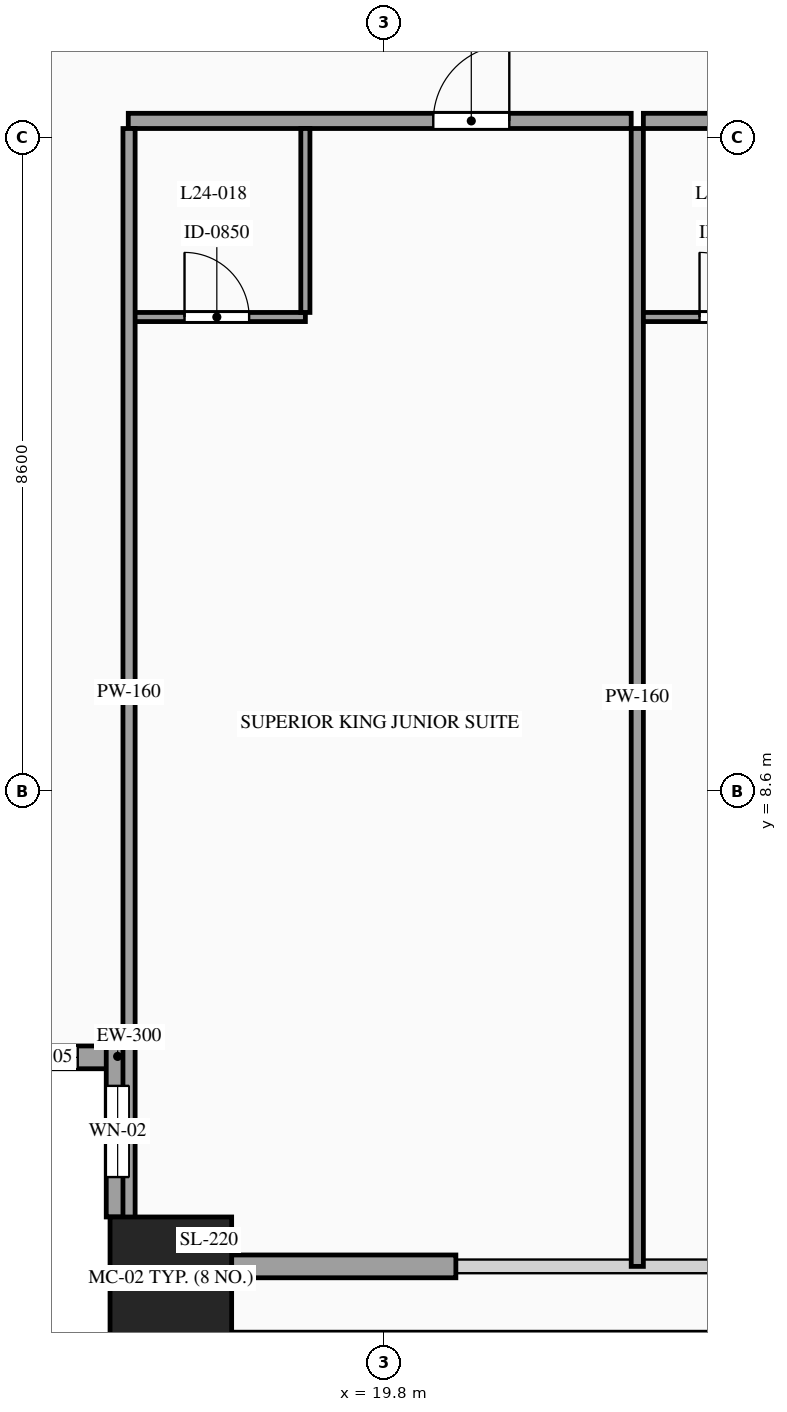
"""IFC4 building model, lengths in metres.
Left out: names, types, materials, properties, quantities, classifications, styles, units other than length and angle.
Written with IfcOpenShell. Run it as: python <this file> out.ifc"""

import sys

from ifc_helpers import new_model, si_unit, direction, frame, frame_2d, origin, origin_2d, place, context, subcontext, project, spatial, rectangle, hollow_rectangle, extrude, source, transform, mapped, element, fill, save


model = new_model("IFC4")
c1 = context("Model", 3, precision=1e-05, world=origin(), true_north=direction((0.0, 1.0)))
c2 = subcontext(c1, "Body", "Model", "MODEL_VIEW")
j1 = project(units=[si_unit("LENGTHUNIT", "METRE"), si_unit("PLANEANGLEUNIT", "RADIAN")], contexts=[c1])
p1 = place(None, origin())
s1 = spatial("IfcSite", under=j1, at=p1, CompositionType="ELEMENT")
p2 = place(p1, origin())
s2 = spatial("IfcBuilding", under=s1, at=p2, CompositionType="ELEMENT")
p3 = place(p2, frame((0.0, 0.0, 93.8)))
s3 = spatial("IfcBuildingStorey", under=s2, at=p3, CompositionType="ELEMENT", Elevation=93.8)
m1 = source(origin(), c2, "Body", "SweptSolid", [
    extrude(hollow_rectangle(XDim=1.6, YDim=1.6, WallThickness=0.07, at=origin_2d()), origin(), (0.0, 0.0, 1.0), 3.6),
])
p4 = place(p3, frame((17.0, 2.2, 0.0), z_axis=(0.0, 0.0, 1.0), x_axis=(1.0, 0.0, 0.0)))
e1 = element("IfcColumn", 1, at=p4, inside=s3, PredefinedType="COLUMN", context=c2, shape_type="MappedRepresentation", body=[
    mapped(m1, transform((0.0, 0.0, 0.0), scale=1.0)),
])
p5 = place(p3, frame((14.2, 5.1, 0.0), z_axis=(0.0, 0.0, 1.0), x_axis=(1.0, 0.0, 0.0)))
e2 = element("IfcWall", 2, at=p5, inside=s3, PredefinedType="SOLIDWALL", context=c2, shape_type="SweptSolid", body=[
    extrude(rectangle(XDim=2.25, YDim=0.3, at=frame_2d((1.125, 0.0))), origin(), (0.0, 0.0, 1.0), 3.38),
])
p6 = place(p5, frame((0.675, 0.0, 0.85)))
e3 = element("IfcOpeningElement", 3, at=p6, cuts=e2, PredefinedType="OPENING", context=c2, shape_type="SweptSolid", body=[
    extrude(rectangle(XDim=0.9, YDim=1.5, at=frame_2d((0.45, 0.75))), frame((0.0, 0.165, 0.0), z_axis=(0.0, -1.0, 0.0), x_axis=(1.0, 0.0, 0.0)), (0.0, 0.0, 1.0), 0.33),
])
p7 = place(p3, frame((16.3, 5.25, 0.0), z_axis=(0.0, 0.0, 1.0), x_axis=(0.0, -1.0, 0.0)))
e4 = element("IfcWall", 4, at=p7, inside=s3, PredefinedType="SOLIDWALL", context=c2, shape_type="SweptSolid", body=[
    extrude(rectangle(XDim=2.25, YDim=0.3, at=frame_2d((1.125, 0.0))), origin(), (0.0, 0.0, 1.0), 3.38),
])
p8 = place(p7, frame((0.525, 0.0, 0.85)))
e5 = element("IfcOpeningElement", 5, at=p8, cuts=e4, PredefinedType="OPENING", context=c2, shape_type="SweptSolid", body=[
    extrude(rectangle(XDim=1.2, YDim=2.1, at=frame_2d((0.6, 1.05))), frame((0.0, 0.165, 0.0), z_axis=(0.0, -1.0, 0.0), x_axis=(1.0, 0.0, 0.0)), (0.0, 0.0, 1.0), 0.33),
])
m2 = source(origin(), c2, "Body", "SweptSolid", [
    extrude(rectangle(XDim=2.95, YDim=0.3, at=frame_2d((1.475, 0.0))), origin(), (0.0, 0.0, 1.0), 2.775),
])
p9 = place(p3, frame((17.8, 2.35, 0.0), z_axis=(0.0, 0.0, 1.0), x_axis=(1.0, 0.0, 0.0)))
e6 = element("IfcWall", 6, at=p9, inside=s3, PredefinedType="SOLIDWALL", context=c2, shape_type="MappedRepresentation", body=[
    mapped(m2, transform((0.0, 0.0, 0.0), scale=1.0)),
])
p10 = place(p3, frame((16.44, 17.42, 0.0), z_axis=(0.0, 0.0, 1.0), x_axis=(1.0, 0.0, 0.0)))
e7 = element("IfcWall", 7, at=p10, inside=s3, PredefinedType="PARTITIONING", context=c2, shape_type="SweptSolid", body=[
    extrude(rectangle(XDim=6.617, YDim=0.2, at=frame_2d((3.309, 0.0))), origin(), (0.0, 0.0, 1.0), 3.38),
])
p11 = place(p10, frame((4.013, 0.0, 0.0)))
e8 = element("IfcOpeningElement", 8, at=p11, cuts=e7, PredefinedType="OPENING", context=c2, shape_type="SweptSolid", body=[
    extrude(rectangle(XDim=1.0, YDim=2.2, at=frame_2d((0.5, 1.1))), frame((0.0, 0.115, 0.0), z_axis=(0.0, -1.0, 0.0), x_axis=(1.0, 0.0, 0.0)), (0.0, 0.0, 1.0), 0.23),
])
m3 = source(origin(), c2, "Body", "SweptSolid", [
    extrude(rectangle(XDim=14.97, YDim=0.16, at=frame_2d((7.485, 0.0))), origin(), (0.0, 0.0, 1.0), 3.38),
])
p12 = place(p3, frame((23.137, 2.35, 0.0), z_axis=(0.0, 0.0, 1.0), x_axis=(0.0, 1.0, 0.0)))
e9 = element("IfcWall", 9, at=p12, inside=s3, PredefinedType="PARTITIONING", context=c2, shape_type="MappedRepresentation", body=[
    mapped(m3, transform((0.0, 0.0, 0.0), scale=1.0)),
])
p13 = place(p3, frame((16.44, 14.84, 0.0), z_axis=(0.0, 0.0, 1.0), x_axis=(1.0, 0.0, 0.0)))
e10 = element("IfcWall", 10, at=p13, inside=s3, PredefinedType="PARTITIONING", context=c2, shape_type="SweptSolid", body=[
    extrude(rectangle(XDim=2.33, YDim=0.12, at=frame_2d((1.165, 0.0))), origin(), (0.0, 0.0, 1.0), 3.38),
])
p14 = place(p13, frame((0.74, 0.0, 0.0)))
e11 = element("IfcOpeningElement", 11, at=p14, cuts=e10, PredefinedType="OPENING", context=c2, shape_type="SweptSolid", body=[
    extrude(rectangle(XDim=0.85, YDim=2.1, at=frame_2d((0.425, 1.05))), frame((0.0, 0.075, 0.0), z_axis=(0.0, -1.0, 0.0), x_axis=(1.0, 0.0, 0.0)), (0.0, 0.0, 1.0), 0.15),
])
m4 = source(origin(), c2, "Body", "SweptSolid", [
    extrude(rectangle(XDim=2.42, YDim=0.12, at=frame_2d((1.21, 0.0))), origin(), (0.0, 0.0, 1.0), 3.38),
])
p15 = place(p3, frame((18.77, 14.9, 0.0), z_axis=(0.0, 0.0, 1.0), x_axis=(0.0, 1.0, 0.0)))
e12 = element("IfcWall", 12, at=p15, inside=s3, PredefinedType="PARTITIONING", context=c2, shape_type="MappedRepresentation", body=[
    mapped(m4, transform((0.0, 0.0, 0.0), scale=1.0)),
])
p16 = place(p3, frame((23.217, 17.42, 0.0), z_axis=(0.0, 0.0, 1.0), x_axis=(1.0, 0.0, 0.0)))
e13 = element("IfcWall", 13, at=p16, inside=s3, PredefinedType="PARTITIONING", context=c2, shape_type="SweptSolid", body=[
    extrude(rectangle(XDim=4.398, YDim=0.2, at=frame_2d((2.199, 0.0))), origin(), (0.0, 0.0, 1.0), 3.38),
])
p17 = place(p16, frame((2.903, 0.0, 0.0)))
e14 = element("IfcOpeningElement", 14, at=p17, cuts=e13, PredefinedType="OPENING", context=c2, shape_type="SweptSolid", body=[
    extrude(rectangle(XDim=1.0, YDim=2.2, at=frame_2d((0.5, 1.1))), frame((0.0, 0.115, 0.0), z_axis=(0.0, -1.0, 0.0), x_axis=(1.0, 0.0, 0.0)), (0.0, 0.0, 1.0), 0.23),
])
p18 = place(p3, frame((23.217, 14.84, 0.0), z_axis=(0.0, 0.0, 1.0), x_axis=(1.0, 0.0, 0.0)))
e15 = element("IfcWall", 15, at=p18, inside=s3, PredefinedType="PARTITIONING", context=c2, shape_type="SweptSolid", body=[
    extrude(rectangle(XDim=2.328, YDim=0.12, at=frame_2d((1.164, 0.0))), origin(), (0.0, 0.0, 1.0), 3.38),
])
p19 = place(p18, frame((0.739, 0.0, 0.0)))
e16 = element("IfcOpeningElement", 16, at=p19, cuts=e15, PredefinedType="OPENING", context=c2, shape_type="SweptSolid", body=[
    extrude(rectangle(XDim=0.85, YDim=2.1, at=frame_2d((0.425, 1.05))), frame((0.0, 0.075, 0.0), z_axis=(0.0, -1.0, 0.0), x_axis=(1.0, 0.0, 0.0)), (0.0, 0.0, 1.0), 0.15),
])
m5 = source(origin(), c2, "Body", "SweptSolid", [
    extrude(rectangle(XDim=14.82, YDim=0.16, at=frame_2d((7.41, 0.0))), origin(), (0.0, 0.0, 1.0), 3.38),
])
p20 = place(p3, frame((16.45, 2.5, 0.0), z_axis=(0.0, 0.0, 1.0), x_axis=(0.0, 1.0, 0.0)))
e17 = element("IfcWall", 17, at=p20, inside=s3, PredefinedType="PARTITIONING", context=c2, shape_type="MappedRepresentation", body=[
    mapped(m5, transform((0.0, 0.0, 0.0), scale=1.0)),
])
m6 = source(origin(), c2, "Body", "SweptSolid", [
    extrude(rectangle(XDim=0.9, YDim=1.5, at=frame_2d((0.45, 0.75))), frame((0.0, 0.03, 0.0), z_axis=(0.0, -1.0, 0.0), x_axis=(1.0, 0.0, 0.0)), (0.0, 0.0, 1.0), 0.06),
])
p21 = place(p6, origin())
e18 = element("IfcWindow", 18, at=p21, inside=s3, PartitioningType="SINGLE_PANEL", PredefinedType="WINDOW", context=c2, shape_type="MappedRepresentation", body=[
    mapped(m6, transform((0.0, 0.0, 0.0), scale=1.0)),
])
fill(e3, e18)
m7 = source(origin(), c2, "Body", "SweptSolid", [
    extrude(rectangle(XDim=1.2, YDim=2.1, at=frame_2d((0.6, 1.05))), frame((0.0, 0.03, 0.0), z_axis=(0.0, -1.0, 0.0), x_axis=(1.0, 0.0, 0.0)), (0.0, 0.0, 1.0), 0.06),
])
p22 = place(p8, origin())
e19 = element("IfcWindow", 19, at=p22, inside=s3, PartitioningType="SINGLE_PANEL", PredefinedType="WINDOW", context=c2, shape_type="MappedRepresentation", body=[
    mapped(m7, transform((0.0, 0.0, 0.0), scale=1.0)),
])
fill(e5, e19)
m8 = source(origin(), c2, "Body", "SweptSolid", [
    extrude(rectangle(XDim=1.0, YDim=2.2, at=frame_2d((0.5, 1.1))), frame((0.0, 0.025, 0.0), z_axis=(0.0, -1.0, 0.0), x_axis=(1.0, 0.0, 0.0)), (0.0, 0.0, 1.0), 0.05),
])
p23 = place(p11, origin())
e20 = element("IfcDoor", 20, at=p23, inside=s3, OperationType="SINGLE_SWING_RIGHT", PredefinedType="DOOR", context=c2, shape_type="MappedRepresentation", body=[
    mapped(m8, transform((0.0, 0.0, 0.0), scale=1.0)),
])
fill(e8, e20)
m9 = source(origin(), c2, "Body", "SweptSolid", [
    extrude(rectangle(XDim=0.85, YDim=2.1, at=frame_2d((0.425, 1.05))), frame((0.0, 0.025, 0.0), z_axis=(0.0, -1.0, 0.0), x_axis=(1.0, 0.0, 0.0)), (0.0, 0.0, 1.0), 0.05),
])
p24 = place(p14, origin())
e21 = element("IfcDoor", 21, at=p24, inside=s3, OperationType="SINGLE_SWING_LEFT", PredefinedType="DOOR", context=c2, shape_type="MappedRepresentation", body=[
    mapped(m9, transform((0.0, 0.0, 0.0), scale=1.0)),
])
fill(e11, e21)
p25 = place(p19, origin())
e22 = element("IfcDoor", 22, at=p25, inside=s3, OperationType="SINGLE_SWING_LEFT", PredefinedType="DOOR", context=c2, shape_type="MappedRepresentation", body=[
    mapped(m9, transform((0.0, 0.0, 0.0), scale=1.0)),
])
fill(e16, e22)
save(model, sys.argv[1])
